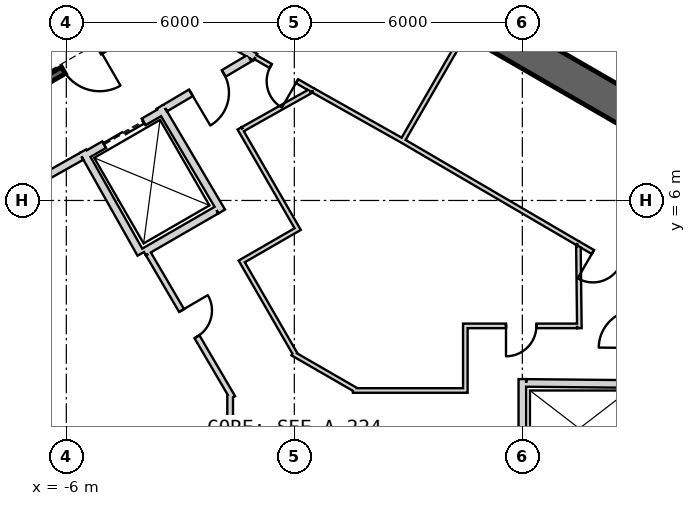
"""IFC4 building model, lengths in metres.
Left out: names, types, materials, properties, quantities, classifications, styles, units other than length and angle.
Written with IfcOpenShell. Run it as: python <this file> out.ifc"""

import sys

from ifc_helpers import new_model, si_unit, direction, frame, frame_2d, origin, place, context, subcontext, project, spatial, rectangle, extrude, element, fill, save


model = new_model("IFC4")
c1 = context("Model", 3, precision=1e-05, world=origin(), true_north=direction((0.0, 1.0)))
c2 = subcontext(c1, "Body", "Model", "MODEL_VIEW")
j1 = project(units=[si_unit("LENGTHUNIT", "METRE"), si_unit("PLANEANGLEUNIT", "RADIAN")], contexts=[c1])
p1 = place(None, origin())
s1 = spatial("IfcSite", under=j1, at=p1, CompositionType="ELEMENT")
p2 = place(p1, origin())
s2 = spatial("IfcBuilding", under=s1, at=p2, CompositionType="ELEMENT")
p3 = place(p2, frame((0.0, 0.0, 205.2)))
s3 = spatial("IfcBuildingStorey", under=s2, at=p3, CompositionType="ELEMENT", Elevation=205.2)
p4 = place(p3, frame((19.475, 2.208, 0.0), z_axis=(0.0, 0.0, 1.0), x_axis=(-0.866028369851, 0.499994862586, 0.0)))
e1 = element("IfcWall", 1, at=p4, inside=s3, PredefinedType="SHEAR", context=c2, shape_type="SweptSolid", body=[
    extrude(rectangle(XDim=31.523, YDim=0.9, at=frame_2d((15.762, 0.0))), origin(), (0.0, 0.0, 1.0), 4.0),
])
p5 = place(p4, frame((7.062, 0.0, 0.0)))
e2 = element("IfcOpeningElement", 2, at=p5, cuts=e1, PredefinedType="OPENING", context=c2, shape_type="SweptSolid", body=[
    extrude(rectangle(XDim=1.2, YDim=2.4, at=frame_2d((0.6, 1.2))), frame((0.0, 0.46, 0.0), z_axis=(0.0, -1.0, 0.0), x_axis=(1.0, 0.0, 0.0)), (0.0, 0.0, 1.0), 0.92),
])
p6 = place(p4, frame((3.612, 0.0, 0.0)))
e3 = element("IfcOpeningElement", 3, at=p6, cuts=e1, PredefinedType="OPENING", context=c2, shape_type="SweptSolid", body=[
    extrude(rectangle(XDim=1.2, YDim=2.4, at=frame_2d((0.6, 1.2))), frame((0.0, 0.46, 0.0), z_axis=(0.0, -1.0, 0.0), x_axis=(1.0, 0.0, 0.0)), (0.0, 0.0, 1.0), 0.92),
])
p7 = place(p4, frame((26.712, 0.0, 0.0)))
e4 = element("IfcOpeningElement", 4, at=p7, cuts=e1, PredefinedType="OPENING", context=c2, shape_type="SweptSolid", body=[
    extrude(rectangle(XDim=1.2, YDim=2.4, at=frame_2d((0.6, 1.2))), frame((0.0, 0.46, 0.0), z_axis=(0.0, -1.0, 0.0), x_axis=(1.0, 0.0, 0.0)), (0.0, 0.0, 1.0), 0.92),
])
p8 = place(p3, frame((6.0, -1.09, 0.0), z_axis=(0.0, 0.0, 1.0), x_axis=(0.0, 1.0, 0.0)))
e5 = element("IfcWall", 5, at=p8, inside=s3, PredefinedType="PLUMBINGWALL", context=c2, shape_type="SweptSolid", body=[
    extrude(rectangle(XDim=2.39, YDim=0.2, at=frame_2d((1.195, 0.0))), origin(), (0.0, 0.0, 1.0), 3.7),
])
p9 = place(p3, frame((9.1, 1.169, 0.0), z_axis=(0.0, 0.0, 1.0), x_axis=(-0.99994990606, 0.010009264196, 0.0)))
e6 = element("IfcWall", 6, at=p9, inside=s3, PredefinedType="PLUMBINGWALL", context=c2, shape_type="SweptSolid", body=[
    extrude(rectangle(XDim=3.0, YDim=0.2, at=frame_2d((1.5, 0.0))), origin(), (0.0, 0.0, 1.0), 3.7),
])
p10 = place(p3, frame((-7.159, 8.8, -0.3), z_axis=(0.0, 0.0, 1.0), x_axis=(0.866047807691, 0.499961193289, 0.0)))
e7 = element("IfcWall", 7, at=p10, inside=s3, PredefinedType="SHEAR", context=c2, shape_type="SweptSolid", body=[
    extrude(rectangle(XDim=3.6, YDim=0.2, at=frame_2d((1.8, 0.0))), origin(), (0.0, 0.0, 1.0), 4.0),
])
p11 = place(p10, frame((1.25, 0.0, 0.3)))
e8 = element("IfcOpeningElement", 8, at=p11, cuts=e7, PredefinedType="OPENING", context=c2, shape_type="SweptSolid", body=[
    extrude(rectangle(XDim=1.1, YDim=2.1, at=frame_2d((0.55, 1.05))), frame((0.0, 0.11, 0.0), z_axis=(0.0, -1.0, 0.0), x_axis=(1.0, 0.0, 0.0)), (0.0, 0.0, 1.0), 0.22),
])
p12 = place(p3, frame((-5.524, 7.168, 0.0), z_axis=(0.0, 0.0, 1.0), x_axis=(0.866024647952, 0.500001309137, 0.0)))
e9 = element("IfcWall", 9, at=p12, inside=s3, PredefinedType="PLUMBINGWALL", context=c2, shape_type="SweptSolid", body=[
    extrude(rectangle(XDim=2.4, YDim=0.2, at=frame_2d((1.2, 0.0))), origin(), (0.0, 0.0, 1.0), 3.7),
])
p13 = place(p12, frame((0.6, 0.0, 0.0)))
e10 = element("IfcOpeningElement", 10, at=p13, cuts=e9, PredefinedType="OPENING", context=c2, shape_type="SweptSolid", body=[
    extrude(rectangle(XDim=1.2, YDim=2.4, at=frame_2d((0.6, 1.2))), frame((0.0, 0.11, 0.0), z_axis=(0.0, -1.0, 0.0), x_axis=(1.0, 0.0, 0.0)), (0.0, 0.0, 1.0), 0.22),
])
p14 = place(p3, frame((-4.039, 4.596, 0.0), z_axis=(0.0, 0.0, 1.0), x_axis=(-0.491322718731, 0.870977603649, 0.0)))
e11 = element("IfcWall", 11, at=p14, inside=s3, PredefinedType="PLUMBINGWALL", context=c2, shape_type="SweptSolid", body=[
    extrude(rectangle(XDim=3.1, YDim=0.2, at=frame_2d((1.55, 0.0))), origin(), (0.0, 0.0, 1.0), 3.7),
])
p15 = place(p3, frame((-3.538, 8.465, 0.0), z_axis=(0.0, 0.0, 1.0), x_axis=(0.508616218331, -0.860993346345, 0.0)))
e12 = element("IfcWall", 12, at=p15, inside=s3, PredefinedType="PLUMBINGWALL", context=c2, shape_type="SweptSolid", body=[
    extrude(rectangle(XDim=3.2, YDim=0.2, at=frame_2d((1.6, 0.0))), origin(), (0.0, 0.0, 1.0), 3.7),
])
p16 = place(p3, frame((-2.047, 5.746, 0.0), z_axis=(0.0, 0.0, 1.0), x_axis=(-0.866019606374, -0.500010041276, 0.0)))
e13 = element("IfcWall", 13, at=p16, inside=s3, PredefinedType="PLUMBINGWALL", context=c2, shape_type="SweptSolid", body=[
    extrude(rectangle(XDim=2.205, YDim=0.2, at=frame_2d((1.102, 0.0))), origin(), (0.0, 0.0, 1.0), 3.7),
])
p17 = place(p3, frame((4.457, 10.359, 0.0), z_axis=(0.0, 0.0, 1.0), x_axis=(-0.500017246033, -0.866015446554, 0.0)))
e14 = element("IfcWall", 14, at=p17, inside=s3, PredefinedType="PARTITIONING", context=c2, shape_type="SweptSolid", body=[
    extrude(rectangle(XDim=3.25, YDim=0.12, at=frame_2d((1.625, 0.0))), origin(), (0.0, 0.0, 1.0), 3.7),
])
p18 = place(p3, frame((7.457, 4.875, 0.0), z_axis=(0.0, 0.0, 1.0), x_axis=(-0.863262357411, 0.504755487615, 0.0)))
e15 = element("IfcWall", 15, at=p18, inside=s3, PredefinedType="PARTITIONING", context=c2, shape_type="SweptSolid", body=[
    extrude(rectangle(XDim=5.37, YDim=0.12, at=frame_2d((2.685, 0.0))), origin(), (0.0, 0.0, 1.0), 3.7),
])
p19 = place(p3, frame((-1.024, 9.771, 0.0), z_axis=(0.0, 0.0, 1.0), x_axis=(0.866039397417, -0.499975761534, 0.0)))
e16 = element("IfcWall", 16, at=p19, inside=s3, PredefinedType="PARTITIONING", context=c2, shape_type="SweptSolid", body=[
    extrude(rectangle(XDim=1.752, YDim=0.12, at=frame_2d((0.876, 0.0))), origin(), (0.0, 0.0, 1.0), 3.7),
])
p20 = place(p19, frame((0.466, 0.0, 0.0)))
e17 = element("IfcOpeningElement", 17, at=p20, cuts=e16, PredefinedType="OPENING", context=c2, shape_type="SweptSolid", body=[
    extrude(rectangle(XDim=0.8, YDim=2.1, at=frame_2d((0.4, 1.05))), frame((0.0, 0.07, 0.0), z_axis=(0.0, -1.0, 0.0), x_axis=(1.0, 0.0, 0.0)), (0.0, 0.0, 1.0), 0.14),
])
p21 = place(p3, frame((7.457, 4.875, 0.0), z_axis=(0.0, 0.0, 1.0), x_axis=(0.866027945518, -0.499995597562, 0.0)))
e18 = element("IfcWall", 18, at=p21, inside=s3, PredefinedType="PARTITIONING", context=c2, shape_type="SweptSolid", body=[
    extrude(rectangle(XDim=1.702, YDim=0.12, at=frame_2d((0.851, 0.0))), origin(), (0.0, 0.0, 1.0), 3.7),
])
p22 = place(p21, frame((0.461, 0.0, 0.0)))
e19 = element("IfcOpeningElement", 19, at=p22, cuts=e18, PredefinedType="OPENING", context=c2, shape_type="SweptSolid", body=[
    extrude(rectangle(XDim=0.8, YDim=2.1, at=frame_2d((0.4, 1.05))), frame((0.0, 0.07, 0.0), z_axis=(0.0, -1.0, 0.0), x_axis=(1.0, 0.0, 0.0)), (0.0, 0.0, 1.0), 0.14),
])
p23 = place(p3, frame((-4.296, 11.66, 0.0), z_axis=(0.0, 0.0, 1.0), x_axis=(0.866027389382, -0.499996560828, 0.0)))
e20 = element("IfcWall", 20, at=p23, inside=s3, PredefinedType="PARTITIONING", context=c2, shape_type="SweptSolid", body=[
    extrude(rectangle(XDim=3.778, YDim=0.2, at=frame_2d((1.889, 0.0))), origin(), (0.0, 0.0, 1.0), 3.7),
])
p24 = place(p3, frame((2.821, 7.586, 0.0), z_axis=(0.0, 0.0, 1.0), x_axis=(-0.871426548871, 0.490526013503, 0.0)))
e21 = element("IfcWall", 21, at=p24, inside=s3, PredefinedType="PARTITIONING", context=c2, shape_type="SweptSolid", body=[
    extrude(rectangle(XDim=2.67, YDim=0.12, at=frame_2d((1.335, 0.0))), origin(), (0.0, 0.0, 1.0), 3.7),
])
p25 = place(p3, frame((-5.6, 7.16, 0.0), z_axis=(0.0, 0.0, 1.0), x_axis=(-0.871340486379, -0.490678873396, 0.0)))
e22 = element("IfcWall", 22, at=p25, inside=s3, PredefinedType="PARTITIONING", context=c2, shape_type="SweptSolid", body=[
    extrude(rectangle(XDim=2.581, YDim=0.2, at=frame_2d((1.291, 0.0))), origin(), (0.0, 0.0, 1.0), 3.7),
])
p26 = place(p3, frame((-1.179, 9.745, 0.0), z_axis=(0.0, 0.0, 1.0), x_axis=(-0.860630814782, -0.509229418482, 0.0)))
e23 = element("IfcWall", 23, at=p26, inside=s3, PredefinedType="PARTITIONING", context=c2, shape_type="SweptSolid", body=[
    extrude(rectangle(XDim=2.582, YDim=0.2, at=frame_2d((1.291, 0.0))), origin(), (0.0, 0.0, 1.0), 3.7),
])
p27 = place(p26, frame((0.791, 0.0, 0.0)))
e24 = element("IfcOpeningElement", 24, at=p27, cuts=e23, PredefinedType="OPENING", context=c2, shape_type="SweptSolid", body=[
    extrude(rectangle(XDim=1.0, YDim=2.1, at=frame_2d((0.5, 1.05))), frame((0.0, 0.11, 0.0), z_axis=(0.0, -1.0, 0.0), x_axis=(1.0, 0.0, 0.0)), (0.0, 0.0, 1.0), 0.22),
])
p28 = place(p3, frame((-1.624, 0.815, 0.0), z_axis=(0.0, 0.0, 1.0), x_axis=(-0.505868173579, 0.862610799237, 0.0)))
e25 = element("IfcWall", 25, at=p28, inside=s3, PredefinedType="PLUMBINGWALL", context=c2, shape_type="SweptSolid", body=[
    extrude(rectangle(XDim=4.383, YDim=0.15, at=frame_2d((2.191, 0.0))), origin(), (0.0, 0.0, 1.0), 3.7),
])
p29 = place(p28, frame((1.855, 0.0, 0.0)))
e26 = element("IfcOpeningElement", 26, at=p29, cuts=e25, PredefinedType="OPENING", context=c2, shape_type="SweptSolid", body=[
    extrude(rectangle(XDim=0.8, YDim=2.1, at=frame_2d((0.4, 1.05))), frame((0.0, 0.085, 0.0), z_axis=(0.0, -1.0, 0.0), x_axis=(1.0, 0.0, 0.0)), (0.0, 0.0, 1.0), 0.17),
])
p30 = place(p3, frame((-1.689, -1.053, 0.0), z_axis=(0.0, 0.0, 1.0), x_axis=(0.0, 1.0, 0.0)))
e27 = element("IfcWall", 27, at=p30, inside=s3, PredefinedType="PLUMBINGWALL", context=c2, shape_type="SweptSolid", body=[
    extrude(rectangle(XDim=1.954, YDim=0.15, at=frame_2d((0.977, 0.0))), origin(), (0.0, 0.0, 1.0), 3.7),
])
p31 = place(p3, frame((7.501, 2.64, 0.0), z_axis=(0.0, 0.0, 1.0), x_axis=(-0.01178388431, 0.999930567625, 0.0)))
e28 = element("IfcWall", 28, at=p31, inside=s3, PredefinedType="PARTITIONING", context=c2, shape_type="SweptSolid", body=[
    extrude(rectangle(XDim=2.155, YDim=0.12, at=frame_2d((1.077, 0.0))), origin(), (0.0, 0.0, 1.0), 3.7),
])
p32 = place(p3, frame((4.44, 2.7, 0.0), z_axis=(0.0, 0.0, 1.0), x_axis=(1.0, 0.0, 0.0)))
e29 = element("IfcWall", 29, at=p32, inside=s3, PredefinedType="PARTITIONING", context=c2, shape_type="SweptSolid", body=[
    extrude(rectangle(XDim=3.0, YDim=0.12, at=frame_2d((1.5, 0.0))), origin(), (0.0, 0.0, 1.0), 3.7),
])
p33 = place(p32, frame((1.13, 0.0, 0.0)))
e30 = element("IfcOpeningElement", 30, at=p33, cuts=e29, PredefinedType="OPENING", context=c2, shape_type="SweptSolid", body=[
    extrude(rectangle(XDim=0.8, YDim=2.1, at=frame_2d((0.4, 1.05))), frame((0.0, 0.07, 0.0), z_axis=(0.0, -1.0, 0.0), x_axis=(1.0, 0.0, 0.0)), (0.0, 0.0, 1.0), 0.14),
])
p34 = place(p3, frame((4.5, 0.94, 0.0), z_axis=(0.0, 0.0, 1.0), x_axis=(0.0, 1.0, 0.0)))
e31 = element("IfcWall", 31, at=p34, inside=s3, PredefinedType="PARTITIONING", context=c2, shape_type="SweptSolid", body=[
    extrude(rectangle(XDim=1.7, YDim=0.12, at=frame_2d((0.85, 0.0))), origin(), (0.0, 0.0, 1.0), 3.7),
])
p35 = place(p3, frame((1.542, 1.0, 0.0), z_axis=(0.0, 0.0, 1.0), x_axis=(1.0, 0.0, 0.0)))
e32 = element("IfcWall", 32, at=p35, inside=s3, PredefinedType="PARTITIONING", context=c2, shape_type="SweptSolid", body=[
    extrude(rectangle(XDim=2.898, YDim=0.12, at=frame_2d((1.449, 0.0))), origin(), (0.0, 0.0, 1.0), 3.7),
])
p36 = place(p3, frame((-0.047, 1.977, 0.0), z_axis=(0.0, 0.0, 1.0), x_axis=(0.865998615205, -0.500046396311, 0.0)))
e33 = element("IfcWall", 33, at=p36, inside=s3, PredefinedType="PARTITIONING", context=c2, shape_type="SweptSolid", body=[
    extrude(rectangle(XDim=1.935, YDim=0.12, at=frame_2d((0.968, 0.0))), origin(), (0.0, 0.0, 1.0), 3.7),
])
p37 = place(p3, frame((-1.414, 4.449, 0.0), z_axis=(0.0, 0.0, 1.0), x_axis=(0.500028961621, -0.866008682139, 0.0)))
e34 = element("IfcWall", 34, at=p37, inside=s3, PredefinedType="PARTITIONING", context=c2, shape_type="SweptSolid", body=[
    extrude(rectangle(XDim=2.896, YDim=0.12, at=frame_2d((1.448, 0.0))), origin(), (0.0, 0.0, 1.0), 3.7),
])
p38 = place(p3, frame((0.14, 5.277, 0.0), z_axis=(0.0, 0.0, 1.0), x_axis=(-0.865989465428, -0.500062241894, 0.0)))
e35 = element("IfcWall", 35, at=p38, inside=s3, PredefinedType="PARTITIONING", context=c2, shape_type="SweptSolid", body=[
    extrude(rectangle(XDim=1.7, YDim=0.12, at=frame_2d((0.85, 0.0))), origin(), (0.0, 0.0, 1.0), 3.7),
])
p39 = place(p3, frame((-1.442, 7.897, 0.0), z_axis=(0.0, 0.0, 1.0), x_axis=(0.499990139034, -0.866031096941, 0.0)))
e36 = element("IfcWall", 36, at=p39, inside=s3, PredefinedType="PARTITIONING", context=c2, shape_type="SweptSolid", body=[
    extrude(rectangle(XDim=3.0, YDim=0.12, at=frame_2d((1.5, 0.0))), origin(), (0.0, 0.0, 1.0), 3.7),
])
p40 = place(p3, frame((0.414, 8.871, 0.0), z_axis=(0.0, 0.0, 1.0), x_axis=(-0.871809386997, -0.48984527429, 0.0)))
e37 = element("IfcWall", 37, at=p40, inside=s3, PredefinedType="PARTITIONING", context=c2, shape_type="SweptSolid", body=[
    extrude(rectangle(XDim=2.034, YDim=0.12, at=frame_2d((1.017, 0.0))), origin(), (0.0, 0.0, 1.0), 3.7),
])
p41 = place(p3, frame((23.119, 6.398, 0.0), z_axis=(0.0, 0.0, 1.0), x_axis=(-0.866027034507, 0.499997175495, 0.0)))
e38 = element("IfcWall", 38, at=p41, inside=s3, PredefinedType="PARTITIONING", context=c2, shape_type="SweptSolid", body=[
    extrude(rectangle(XDim=18.873, YDim=0.2, at=frame_2d((9.436, 0.0))), origin(), (0.0, 0.0, 1.0), 2.88),
])
p42 = place(p11, origin())
e39 = element("IfcDoor", 39, at=p42, inside=s3, OperationType="SINGLE_SWING_LEFT", PredefinedType="USERDEFINED", context=c2, shape_type="SweptSolid", body=[
    extrude(rectangle(XDim=1.1, YDim=2.1, at=frame_2d((0.55, 1.05))), frame((0.0, 0.025, 0.0), z_axis=(0.0, -1.0, 0.0), x_axis=(1.0, 0.0, 0.0)), (0.0, 0.0, 1.0), 0.05),
])
fill(e8, e39)
p43 = place(p27, origin())
e40 = element("IfcDoor", 40, at=p43, inside=s3, OperationType="SINGLE_SWING_RIGHT", PredefinedType="USERDEFINED", context=c2, shape_type="SweptSolid", body=[
    extrude(rectangle(XDim=1.0, YDim=2.1, at=frame_2d((0.5, 1.05))), frame((0.0, 0.025, 0.0), z_axis=(0.0, -1.0, 0.0), x_axis=(1.0, 0.0, 0.0)), (0.0, 0.0, 1.0), 0.05),
])
fill(e24, e40)
p44 = place(p13, origin())
e41 = element("IfcDoor", 41, at=p44, inside=s3, OperationType="SLIDING_TO_LEFT", PredefinedType="USERDEFINED", context=c2, shape_type="SweptSolid", body=[
    extrude(rectangle(XDim=1.2, YDim=2.4, at=frame_2d((0.6, 1.2))), frame((0.0, 0.025, 0.0), z_axis=(0.0, -1.0, 0.0), x_axis=(1.0, 0.0, 0.0)), (0.0, 0.0, 1.0), 0.05),
])
fill(e10, e41)
p45 = place(p29, origin())
e42 = element("IfcDoor", 42, at=p45, inside=s3, OperationType="SINGLE_SWING_RIGHT", PredefinedType="USERDEFINED", context=c2, shape_type="SweptSolid", body=[
    extrude(rectangle(XDim=0.8, YDim=2.1, at=frame_2d((0.4, 1.05))), frame((0.0, 0.025, 0.0), z_axis=(0.0, -1.0, 0.0), x_axis=(1.0, 0.0, 0.0)), (0.0, 0.0, 1.0), 0.05),
])
fill(e26, e42)
p46 = place(p33, origin())
e43 = element("IfcDoor", 43, at=p46, inside=s3, OperationType="SINGLE_SWING_RIGHT", PredefinedType="USERDEFINED", context=c2, shape_type="SweptSolid", body=[
    extrude(rectangle(XDim=0.8, YDim=2.1, at=frame_2d((0.4, 1.05))), frame((0.0, 0.025, 0.0), z_axis=(0.0, -1.0, 0.0), x_axis=(1.0, 0.0, 0.0)), (0.0, 0.0, 1.0), 0.05),
])
fill(e30, e43)
p47 = place(p22, origin())
e44 = element("IfcDoor", 44, at=p47, inside=s3, OperationType="SINGLE_SWING_RIGHT", PredefinedType="USERDEFINED", context=c2, shape_type="SweptSolid", body=[
    extrude(rectangle(XDim=0.8, YDim=2.1, at=frame_2d((0.4, 1.05))), frame((0.0, 0.025, 0.0), z_axis=(0.0, -1.0, 0.0), x_axis=(1.0, 0.0, 0.0)), (0.0, 0.0, 1.0), 0.05),
])
fill(e19, e44)
p48 = place(p20, origin())
e45 = element("IfcDoor", 45, at=p48, inside=s3, OperationType="SINGLE_SWING_RIGHT", PredefinedType="USERDEFINED", context=c2, shape_type="SweptSolid", body=[
    extrude(rectangle(XDim=0.8, YDim=2.1, at=frame_2d((0.4, 1.05))), frame((0.0, 0.025, 0.0), z_axis=(0.0, -1.0, 0.0), x_axis=(1.0, 0.0, 0.0)), (0.0, 0.0, 1.0), 0.05),
])
fill(e17, e45)
save(model, sys.argv[1])
